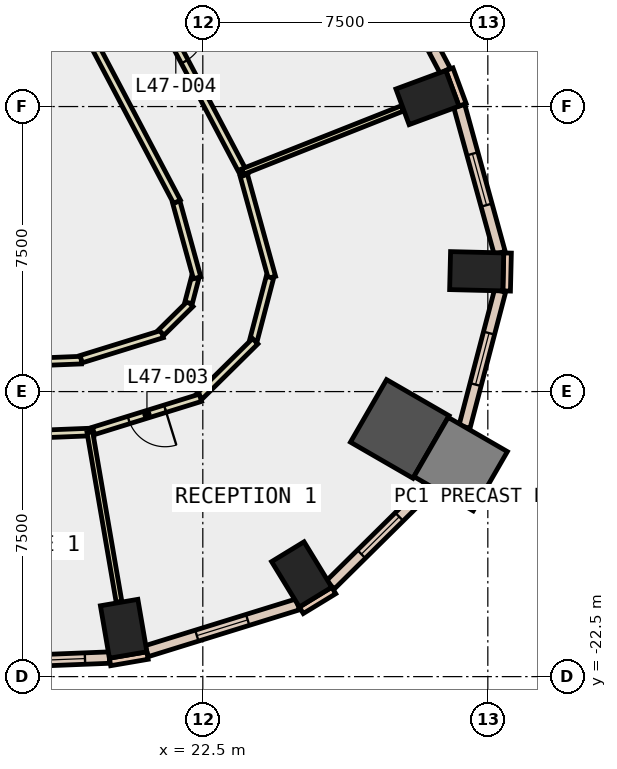
"""IFC4 building model, lengths in metres.
Left out: names, types, materials, properties, quantities, classifications, styles, units other than length and angle.
Written with IfcOpenShell. Run it as: python <this file> out.ifc"""

import sys

from ifc_helpers import new_model, si_unit, direction, frame, frame_2d, origin, origin_2d, place, context, subcontext, project, spatial, rectangle, extrude, element, fill, save


model = new_model("IFC4")
c1 = context("Model", 3, precision=1e-05, world=origin(), true_north=direction((0.0, 1.0)))
c2 = subcontext(c1, "Body", "Model", "MODEL_VIEW")
j1 = project(units=[si_unit("LENGTHUNIT", "METRE"), si_unit("PLANEANGLEUNIT", "RADIAN")], contexts=[c1])
p1 = place(None, origin())
s1 = spatial("IfcSite", under=j1, at=p1, CompositionType="ELEMENT")
p2 = place(p1, origin())
s2 = spatial("IfcBuilding", under=s1, at=p2, CompositionType="ELEMENT")
p3 = place(p2, frame((0.0, 0.0, 210.8)))
s3 = spatial("IfcBuildingStorey", under=s2, at=p3, CompositionType="ELEMENT", Elevation=210.8)
for number, where, z_axis, x_axis in (
    (1, (20.417, -21.241, -0.4), (0.0, 0.0, 1.0), (0.986, 0.169, 0.0)),
    (2, (25.102, -19.811, -0.4), (0.0, 0.0, 1.0), (0.853, 0.521, 0.0)),
):
    element("IfcColumn", number, at=place(p3, frame(where, z_axis=z_axis, x_axis=x_axis)), inside=s3, PredefinedType="COLUMN", context=c2, shape_type="SweptSolid", body=[
        extrude(rectangle(XDim=1.0, YDim=1.4, at=origin_2d()), origin(), (0.0, 0.0, 1.0), 4.2),
    ])
p4 = place(p3, frame((27.683, -15.983, -0.4), z_axis=(0.0, 0.0, 1.0), x_axis=(-0.866025403784, 0.5, 0.0)))
e3 = element("IfcColumn", 3, at=p4, inside=s3, PredefinedType="COLUMN", context=c2, shape_type="SweptSolid", body=[
    extrude(rectangle(XDim=1.9, YDim=1.9, at=origin_2d()), origin(), (0.0, 0.0, 1.0), 4.2),
])
for number, where, z_axis, x_axis in (
    (4, (29.707, -11.834, -0.4), (0.0, 0.0, 1.0), (0.025, 1.0, 0.0)),
    (5, (28.412, -7.264, -0.4), (0.0, 0.0, 1.0), (-0.347, 0.938, 0.0)),
):
    element("IfcColumn", number, at=place(p3, frame(where, z_axis=z_axis, x_axis=x_axis)), inside=s3, PredefinedType="COLUMN", context=c2, shape_type="SweptSolid", body=[
        extrude(rectangle(XDim=1.0, YDim=1.4, at=origin_2d()), origin(), (0.0, 0.0, 1.0), 4.2),
    ])
p5 = place(p3, frame((29.285, -16.908, -0.4), z_axis=(0.0, 0.0, 1.0), x_axis=(-0.866025403784, 0.5, 0.0)))
e6 = element("IfcColumn", 6, at=p5, inside=s3, PredefinedType="COLUMN", context=c2, shape_type="SweptSolid", body=[
    extrude(rectangle(XDim=1.8, YDim=1.8, at=origin_2d()), origin(), (0.0, 0.0, 1.0), 4.2),
])
p6 = place(p3, frame((29.336, -7.456, 0.0), z_axis=(0.0, 0.0, 1.0), x_axis=(-0.346892928577, 0.937904737222, 0.0)))
e7 = element("IfcWall", 7, at=p6, inside=s3, PredefinedType="STANDARD", context=c2, shape_type="SweptSolid", body=[
    extrude(rectangle(XDim=1.0, YDim=0.2, at=frame_2d((0.5, 0.0))), origin(), (0.0, 0.0, 1.0), 3.8),
])
p7 = place(p3, frame((20.059, -22.114, 0.0), z_axis=(0.0, 0.0, 1.0), x_axis=(0.985631544579, 0.168909615862, 0.0)))
e8 = element("IfcWall", 8, at=p7, inside=s3, PredefinedType="STANDARD", context=c2, shape_type="SweptSolid", body=[
    extrude(rectangle(XDim=1.0, YDim=0.2, at=frame_2d((0.5, 0.0))), origin(), (0.0, 0.0, 1.0), 3.8),
])
p8 = place(p3, frame((25.092, -20.754, 0.0), z_axis=(0.0, 0.0, 1.0), x_axis=(0.853679739553, 0.520798331677, 0.0)))
e9 = element("IfcWall", 9, at=p8, inside=s3, PredefinedType="STANDARD", context=c2, shape_type="SweptSolid", body=[
    extrude(rectangle(XDim=1.0, YDim=0.2, at=frame_2d((0.5, 0.0))), origin(), (0.0, 0.0, 1.0), 3.8),
])
p9 = place(p3, frame((30.495, -12.353, 0.0), z_axis=(0.0, 0.0, 1.0), x_axis=(0.023942303888, 0.999713341956, 0.0)))
e10 = element("IfcWall", 10, at=p9, inside=s3, PredefinedType="STANDARD", context=c2, shape_type="SweptSolid", body=[
    extrude(rectangle(XDim=0.999, YDim=0.2, at=frame_2d((0.5, 0.0))), origin(), (0.0, 0.0, 1.0), 3.8),
])
p10 = place(p3, frame((14.679, -22.213, 0.0), z_axis=(0.0, 0.0, 1.0), x_axis=(0.999205241612, 0.039860822062, 0.0)))
e11 = element("IfcWall", 11, at=p10, inside=s3, PredefinedType="STANDARD", context=c2, shape_type="SweptSolid", body=[
    extrude(rectangle(XDim=5.365, YDim=0.3, at=frame_2d((2.683, 0.0))), origin(), (0.0, 0.0, 1.0), 3.8),
])
p11 = place(p10, frame((0.641, 0.0, 0.9)))
e12 = element("IfcOpeningElement", 12, at=p11, cuts=e11, PredefinedType="OPENING", context=c2, shape_type="SweptSolid", body=[
    extrude(rectangle(XDim=1.4, YDim=2.6, at=frame_2d((0.7, 1.3))), frame((0.0, 0.16, 0.0), z_axis=(0.0, -1.0, 0.0), x_axis=(1.0, 0.0, 0.0)), (0.0, 0.0, 1.0), 0.32),
])
p12 = place(p10, frame((3.324, 0.0, 0.9)))
e13 = element("IfcOpeningElement", 13, at=p12, cuts=e11, PredefinedType="OPENING", context=c2, shape_type="SweptSolid", body=[
    extrude(rectangle(XDim=1.4, YDim=2.6, at=frame_2d((0.7, 1.3))), frame((0.0, 0.16, 0.0), z_axis=(0.0, -1.0, 0.0), x_axis=(1.0, 0.0, 0.0)), (0.0, 0.0, 1.0), 0.32),
])
p13 = place(p3, frame((21.024, -21.83, 0.0), z_axis=(0.0, 0.0, 1.0), x_axis=(0.955247215067, 0.295808651171, 0.0)))
e14 = element("IfcWall", 14, at=p13, inside=s3, PredefinedType="STANDARD", context=c2, shape_type="SweptSolid", body=[
    extrude(rectangle(XDim=4.161, YDim=0.3, at=frame_2d((2.081, 0.0))), origin(), (0.0, 0.0, 1.0), 3.8),
])
p14 = place(p13, frame((1.381, 0.0, 0.9)))
e15 = element("IfcOpeningElement", 15, at=p14, cuts=e14, PredefinedType="OPENING", context=c2, shape_type="SweptSolid", body=[
    extrude(rectangle(XDim=1.4, YDim=2.6, at=frame_2d((0.7, 1.3))), frame((0.0, 0.16, 0.0), z_axis=(0.0, -1.0, 0.0), x_axis=(1.0, 0.0, 0.0)), (0.0, 0.0, 1.0), 0.32),
])
p15 = place(p3, frame((25.855, -20.087, 0.0), z_axis=(0.0, 0.0, 1.0), x_axis=(0.711316812334, 0.702871533419, 0.0)))
e16 = element("IfcWall", 16, at=p15, inside=s3, PredefinedType="STANDARD", context=c2, shape_type="SweptSolid", body=[
    extrude(rectangle(XDim=3.7, YDim=0.3, at=frame_2d((1.85, 0.0))), origin(), (0.0, 0.0, 1.0), 3.8),
])
p16 = place(p15, frame((1.15, 0.0, 0.9)))
e17 = element("IfcOpeningElement", 17, at=p16, cuts=e16, PredefinedType="OPENING", context=c2, shape_type="SweptSolid", body=[
    extrude(rectangle(XDim=1.4, YDim=2.6, at=frame_2d((0.7, 1.3))), frame((0.0, 0.16, 0.0), z_axis=(0.0, -1.0, 0.0), x_axis=(1.0, 0.0, 0.0)), (0.0, 0.0, 1.0), 0.32),
])
p17 = place(p3, frame((29.386, -15.928, 0.0), z_axis=(0.0, 0.0, 1.0), x_axis=(0.253200635583, 0.96741378848, 0.0)))
e18 = element("IfcWall", 18, at=p17, inside=s3, PredefinedType="STANDARD", context=c2, shape_type="SweptSolid", body=[
    extrude(rectangle(XDim=3.701, YDim=0.3, at=frame_2d((1.85, 0.0))), origin(), (0.0, 0.0, 1.0), 3.8),
])
p18 = place(p17, frame((1.15, 0.0, 0.9)))
e19 = element("IfcOpeningElement", 19, at=p18, cuts=e18, PredefinedType="OPENING", context=c2, shape_type="SweptSolid", body=[
    extrude(rectangle(XDim=1.4, YDim=2.6, at=frame_2d((0.7, 1.3))), frame((0.0, 0.16, 0.0), z_axis=(0.0, -1.0, 0.0), x_axis=(1.0, 0.0, 0.0)), (0.0, 0.0, 1.0), 0.32),
])
p19 = place(p3, frame((30.312, -11.35, 0.0), z_axis=(0.0, 0.0, 1.0), x_axis=(-0.265534577923, 0.96410133696, 0.0)))
e20 = element("IfcWall", 20, at=p19, inside=s3, PredefinedType="STANDARD", context=c2, shape_type="SweptSolid", body=[
    extrude(rectangle(XDim=4.007, YDim=0.3, at=frame_2d((2.003, 0.0))), origin(), (0.0, 0.0, 1.0), 3.8),
])
p20 = place(p19, frame((1.303, 0.0, 0.9)))
e21 = element("IfcOpeningElement", 21, at=p20, cuts=e20, PredefinedType="OPENING", context=c2, shape_type="SweptSolid", body=[
    extrude(rectangle(XDim=1.4, YDim=2.6, at=frame_2d((0.7, 1.3))), frame((0.0, 0.16, 0.0), z_axis=(0.0, -1.0, 0.0), x_axis=(1.0, 0.0, 0.0)), (0.0, 0.0, 1.0), 0.32),
])
p21 = place(p3, frame((28.879, -6.559, 0.0), z_axis=(0.0, 0.0, 1.0), x_axis=(-0.466789249342, 0.884368586449, 0.0)))
e22 = element("IfcWall", 22, at=p21, inside=s3, PredefinedType="STANDARD", context=c2, shape_type="SweptSolid", body=[
    extrude(rectangle(XDim=7.273, YDim=0.3, at=frame_2d((3.637, 0.0))), origin(), (0.0, 0.0, 1.0), 3.8),
])
p22 = place(p21, frame((0.618, 0.0, 0.9)))
e23 = element("IfcOpeningElement", 23, at=p22, cuts=e22, PredefinedType="OPENING", context=c2, shape_type="SweptSolid", body=[
    extrude(rectangle(XDim=2.4, YDim=2.6, at=frame_2d((1.2, 1.3))), frame((0.0, 0.16, 0.0), z_axis=(0.0, -1.0, 0.0), x_axis=(1.0, 0.0, 0.0)), (0.0, 0.0, 1.0), 0.32),
])
p23 = place(p21, frame((4.255, 0.0, 0.9)))
e24 = element("IfcOpeningElement", 24, at=p23, cuts=e22, PredefinedType="OPENING", context=c2, shape_type="SweptSolid", body=[
    extrude(rectangle(XDim=2.4, YDim=2.6, at=frame_2d((1.2, 1.3))), frame((0.0, 0.16, 0.0), z_axis=(0.0, -1.0, 0.0), x_axis=(1.0, 0.0, 0.0)), (0.0, 0.0, 1.0), 0.32),
])
p24 = place(p3, frame((13.925, -14.387, 0.0), z_axis=(0.0, 0.0, 1.0), x_axis=(0.999202986342, 0.039917315597, 0.0)))
e25 = element("IfcWall", 25, at=p24, inside=s3, PredefinedType="PARTITIONING", context=c2, shape_type="SweptSolid", body=[
    extrude(rectangle(XDim=5.382, YDim=0.2, at=frame_2d((2.691, 0.0))), origin(), (0.0, 0.0, 1.0), 3.8),
])
p25 = place(p3, frame((19.299, -14.147, 0.0), z_axis=(0.0, 0.0, 1.0), x_axis=(0.955241047187, 0.295828568211, 0.0)))
e26 = element("IfcWall", 26, at=p25, inside=s3, PredefinedType="PARTITIONING", context=c2, shape_type="SweptSolid", body=[
    extrude(rectangle(XDim=2.234, YDim=0.2, at=frame_2d((1.117, 0.0))), origin(), (0.0, 0.0, 1.0), 3.8),
])
p26 = place(p3, frame((21.408, -13.445, 0.0), z_axis=(0.0, 0.0, 1.0), x_axis=(0.711298443117, 0.702890122863, 0.0)))
e27 = element("IfcWall", 27, at=p26, inside=s3, PredefinedType="PARTITIONING", context=c2, shape_type="SweptSolid", body=[
    extrude(rectangle(XDim=1.074, YDim=0.2, at=frame_2d((0.537, 0.0))), origin(), (0.0, 0.0, 1.0), 3.8),
])
p27 = place(p3, frame((22.126, -12.664, 0.0), z_axis=(0.0, 0.0, 1.0), x_axis=(0.253079435581, 0.967445501972, 0.0)))
e28 = element("IfcWall", 28, at=p27, inside=s3, PredefinedType="PARTITIONING", context=c2, shape_type="SweptSolid", body=[
    extrude(rectangle(XDim=0.68, YDim=0.2, at=frame_2d((0.34, 0.0))), origin(), (0.0, 0.0, 1.0), 3.8),
])
p28 = place(p3, frame((22.35, -12.006, 0.0), z_axis=(0.0, 0.0, 1.0), x_axis=(-0.265584627827, 0.964087550725, 0.0)))
e29 = element("IfcWall", 29, at=p28, inside=s3, PredefinedType="PARTITIONING", context=c2, shape_type="SweptSolid", body=[
    extrude(rectangle(XDim=2.067, YDim=0.2, at=frame_2d((1.034, 0.0))), origin(), (0.0, 0.0, 1.0), 3.8),
])
p29 = place(p3, frame((21.821, -10.005, 0.0), z_axis=(0.0, 0.0, 1.0), x_axis=(-0.466770012358, 0.884378739887, 0.0)))
e30 = element("IfcWall", 30, at=p29, inside=s3, PredefinedType="PARTITIONING", context=c2, shape_type="SweptSolid", body=[
    extrude(rectangle(XDim=7.449, YDim=0.2, at=frame_2d((3.725, 0.0))), origin(), (0.0, 0.0, 1.0), 3.8),
])
p30 = place(p3, frame((19.627, -16.061, 0.0), z_axis=(0.0, 0.0, 1.0), x_axis=(-0.999206061563, -0.039840262741, 0.0)))
e31 = element("IfcWall", 31, at=p30, inside=s3, PredefinedType="PARTITIONING", context=c2, shape_type="SweptSolid", body=[
    extrude(rectangle(XDim=5.57, YDim=0.2, at=frame_2d((2.785, 0.0))), origin(), (0.0, 0.0, 1.0), 3.8),
])
p31 = place(p30, frame((2.36, 0.0, 0.0)))
e32 = element("IfcOpeningElement", 32, at=p31, cuts=e31, PredefinedType="OPENING", context=c2, shape_type="SweptSolid", body=[
    extrude(rectangle(XDim=1.0, YDim=2.1, at=frame_2d((0.5, 1.05))), frame((0.0, 0.11, 0.0), z_axis=(0.0, -1.0, 0.0), x_axis=(1.0, 0.0, 0.0)), (0.0, 0.0, 1.0), 0.22),
])
p32 = place(p3, frame((23.578, -9.309, 0.0), z_axis=(0.0, 0.0, 1.0), x_axis=(0.265884037198, -0.964005020092, 0.0)))
e33 = element("IfcWall", 33, at=p32, inside=s3, PredefinedType="PARTITIONING", context=c2, shape_type="SweptSolid", body=[
    extrude(rectangle(XDim=2.784, YDim=0.2, at=frame_2d((1.392, 0.0))), origin(), (0.0, 0.0, 1.0), 3.8),
])
p33 = place(p3, frame((24.266, -11.993, 0.0), z_axis=(0.0, 0.0, 1.0), x_axis=(-0.253025690571, -0.967459559832, 0.0)))
e34 = element("IfcWall", 34, at=p33, inside=s3, PredefinedType="PARTITIONING", context=c2, shape_type="SweptSolid", body=[
    extrude(rectangle(XDim=1.712, YDim=0.2, at=frame_2d((0.856, 0.0))), origin(), (0.0, 0.0, 1.0), 3.8),
])
p34 = place(p3, frame((23.878, -13.675, 0.0), z_axis=(0.0, 0.0, 1.0), x_axis=(-0.710949827962, -0.703242733429, 0.0)))
e35 = element("IfcWall", 35, at=p34, inside=s3, PredefinedType="PARTITIONING", context=c2, shape_type="SweptSolid", body=[
    extrude(rectangle(XDim=2.059, YDim=0.2, at=frame_2d((1.03, 0.0))), origin(), (0.0, 0.0, 1.0), 3.8),
])
p35 = place(p3, frame((22.438, -15.163, 0.0), z_axis=(0.0, 0.0, 1.0), x_axis=(-0.955234616163, -0.295849333419, 0.0)))
e36 = element("IfcWall", 36, at=p35, inside=s3, PredefinedType="PARTITIONING", context=c2, shape_type="SweptSolid", body=[
    extrude(rectangle(XDim=2.947, YDim=0.2, at=frame_2d((1.473, 0.0))), origin(), (0.0, 0.0, 1.0), 3.8),
])
p36 = place(p35, frame((0.974, 0.0, 0.0)))
e37 = element("IfcOpeningElement", 37, at=p36, cuts=e36, PredefinedType="OPENING", context=c2, shape_type="SweptSolid", body=[
    extrude(rectangle(XDim=1.0, YDim=2.1, at=frame_2d((0.5, 1.05))), frame((0.0, 0.11, 0.0), z_axis=(0.0, -1.0, 0.0), x_axis=(1.0, 0.0, 0.0)), (0.0, 0.0, 1.0), 0.22),
])
p37 = place(p3, frame((19.98, -2.448, 0.0), z_axis=(0.0, 0.0, 1.0), x_axis=(0.466864023915, -0.884329114738, 0.0)))
e38 = element("IfcWall", 38, at=p37, inside=s3, PredefinedType="PARTITIONING", context=c2, shape_type="SweptSolid", body=[
    extrude(rectangle(XDim=7.75, YDim=0.2, at=frame_2d((3.875, 0.0))), origin(), (0.0, 0.0, 1.0), 3.8),
])
p38 = place(p37, frame((3.375, 0.0, 0.0)))
e39 = element("IfcOpeningElement", 39, at=p38, cuts=e38, PredefinedType="OPENING", context=c2, shape_type="SweptSolid", body=[
    extrude(rectangle(XDim=1.0, YDim=2.1, at=frame_2d((0.5, 1.05))), frame((0.0, 0.11, 0.0), z_axis=(0.0, -1.0, 0.0), x_axis=(1.0, 0.0, 0.0)), (0.0, 0.0, 1.0), 0.22),
])
p39 = place(p3, frame((19.527, -16.065, 0.0), z_axis=(0.0, 0.0, 1.0), x_axis=(0.169437821314, -0.985540879268, 0.0)))
e40 = element("IfcWall", 40, at=p39, inside=s3, PredefinedType="PARTITIONING", context=c2, shape_type="SweptSolid", body=[
    extrude(rectangle(XDim=4.531, YDim=0.15, at=frame_2d((2.266, 0.0))), origin(), (0.0, 0.0, 1.0), 3.8),
])
p40 = place(p3, frame((23.552, -9.212, 0.0), z_axis=(0.0, 0.0, 1.0), x_axis=(0.929720624715, 0.368265610639, 0.0)))
e41 = element("IfcWall", 41, at=p40, inside=s3, PredefinedType="PARTITIONING", context=c2, shape_type="SweptSolid", body=[
    extrude(rectangle(XDim=4.515, YDim=0.15, at=frame_2d((2.258, 0.0))), origin(), (0.0, 0.0, 1.0), 3.8),
])
p41 = place(p12, origin())
e42 = element("IfcWindow", 42, at=p41, inside=s3, PartitioningType="SINGLE_PANEL", PredefinedType="WINDOW", context=c2, shape_type="SweptSolid", body=[
    extrude(rectangle(XDim=1.4, YDim=2.6, at=frame_2d((0.7, 1.3))), frame((0.0, 0.03, 0.0), z_axis=(0.0, -1.0, 0.0), x_axis=(1.0, 0.0, 0.0)), (0.0, 0.0, 1.0), 0.06),
])
fill(e13, e42)
p42 = place(p14, origin())
e43 = element("IfcWindow", 43, at=p42, inside=s3, PartitioningType="SINGLE_PANEL", PredefinedType="WINDOW", context=c2, shape_type="SweptSolid", body=[
    extrude(rectangle(XDim=1.4, YDim=2.6, at=frame_2d((0.7, 1.3))), frame((0.0, 0.03, 0.0), z_axis=(0.0, -1.0, 0.0), x_axis=(1.0, 0.0, 0.0)), (0.0, 0.0, 1.0), 0.06),
])
fill(e15, e43)
p43 = place(p16, origin())
e44 = element("IfcWindow", 44, at=p43, inside=s3, PartitioningType="SINGLE_PANEL", PredefinedType="WINDOW", context=c2, shape_type="SweptSolid", body=[
    extrude(rectangle(XDim=1.4, YDim=2.6, at=frame_2d((0.7, 1.3))), frame((0.0, 0.03, 0.0), z_axis=(0.0, -1.0, 0.0), x_axis=(1.0, 0.0, 0.0)), (0.0, 0.0, 1.0), 0.06),
])
fill(e17, e44)
p44 = place(p18, origin())
e45 = element("IfcWindow", 45, at=p44, inside=s3, PartitioningType="SINGLE_PANEL", PredefinedType="WINDOW", context=c2, shape_type="SweptSolid", body=[
    extrude(rectangle(XDim=1.4, YDim=2.6, at=frame_2d((0.7, 1.3))), frame((0.0, 0.03, 0.0), z_axis=(0.0, -1.0, 0.0), x_axis=(1.0, 0.0, 0.0)), (0.0, 0.0, 1.0), 0.06),
])
fill(e19, e45)
p45 = place(p20, origin())
e46 = element("IfcWindow", 46, at=p45, inside=s3, PartitioningType="SINGLE_PANEL", PredefinedType="WINDOW", context=c2, shape_type="SweptSolid", body=[
    extrude(rectangle(XDim=1.4, YDim=2.6, at=frame_2d((0.7, 1.3))), frame((0.0, 0.03, 0.0), z_axis=(0.0, -1.0, 0.0), x_axis=(1.0, 0.0, 0.0)), (0.0, 0.0, 1.0), 0.06),
])
fill(e21, e46)
p46 = place(p36, origin())
e47 = element("IfcDoor", 47, at=p46, inside=s3, OperationType="SINGLE_SWING_LEFT", PredefinedType="DOOR", context=c2, shape_type="SweptSolid", body=[
    extrude(rectangle(XDim=1.0, YDim=2.1, at=frame_2d((0.5, 1.05))), frame((0.0, 0.025, 0.0), z_axis=(0.0, -1.0, 0.0), x_axis=(1.0, 0.0, 0.0)), (0.0, 0.0, 1.0), 0.05),
])
fill(e37, e47)
p47 = place(p38, origin())
e48 = element("IfcDoor", 48, at=p47, inside=s3, OperationType="SINGLE_SWING_LEFT", PredefinedType="DOOR", context=c2, shape_type="SweptSolid", body=[
    extrude(rectangle(XDim=1.0, YDim=2.1, at=frame_2d((0.5, 1.05))), frame((0.0, 0.025, 0.0), z_axis=(0.0, -1.0, 0.0), x_axis=(1.0, 0.0, 0.0)), (0.0, 0.0, 1.0), 0.05),
])
fill(e39, e48)
save(model, sys.argv[1])
